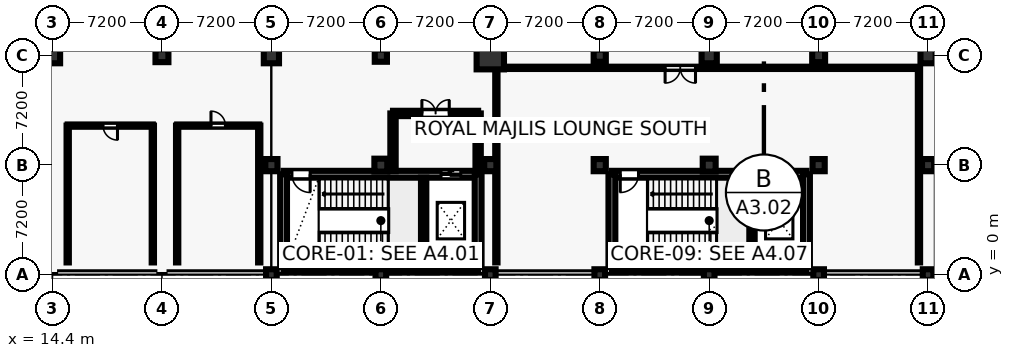
"""IFC4 building model, lengths in metres.
Left out: names, types, materials, properties, quantities, classifications, styles, units other than length and angle.
Written with IfcOpenShell. Run it as: python <this file> out.ifc"""

import sys

from ifc_helpers import new_model, si_unit, direction, frame, frame_2d, origin, origin_2d, place, context, subcontext, project, spatial, rectangle, circle, extrude, element, fill, save


model = new_model("IFC4")
c1 = context("Model", 3, precision=1e-05, world=origin(), true_north=direction((0.0, 1.0)))
c2 = subcontext(c1, "Body", "Model", "MODEL_VIEW")
j1 = project(units=[si_unit("LENGTHUNIT", "METRE"), si_unit("PLANEANGLEUNIT", "RADIAN")], contexts=[c1])
p1 = place(None, origin())
s1 = spatial("IfcSite", under=j1, at=p1, CompositionType="ELEMENT")
p2 = place(p1, origin())
s2 = spatial("IfcBuilding", under=s1, at=p2, CompositionType="ELEMENT")
p3 = place(p2, frame((0.0, 0.0, 5.4)))
s3 = spatial("IfcBuildingStorey", under=s2, at=p3, CompositionType="ELEMENT", Elevation=5.4)
p4 = place(p3, frame((14.4, 14.4, 0.0), z_axis=(0.0, 0.0, 1.0), x_axis=(1.0, 0.0, 0.0)))
e1 = element("IfcColumn", 1, at=p4, inside=s3, PredefinedType="COLUMN", context=c2, shape_type="SweptSolid", body=[
    extrude(circle(Radius=0.5, at=origin_2d()), origin(), (0.0, 0.0, 1.0), 4.2),
])
p5 = place(p3, frame((21.6, 14.4, 0.0), z_axis=(0.0, 0.0, 1.0), x_axis=(1.0, 0.0, 0.0)))
e2 = element("IfcColumn", 2, at=p5, inside=s3, PredefinedType="COLUMN", context=c2, shape_type="SweptSolid", body=[
    extrude(rectangle(XDim=0.85, YDim=0.85, at=origin_2d()), origin(), (0.0, 0.0, 1.0), 4.2),
])
p6 = place(p3, frame((28.8, 0.0, 0.0), z_axis=(0.0, 0.0, 1.0), x_axis=(1.0, 0.0, 0.0)))
e3 = element("IfcColumn", 3, at=p6, inside=s3, PredefinedType="COLUMN", context=c2, shape_type="SweptSolid", body=[
    extrude(rectangle(XDim=0.7, YDim=0.7, at=origin_2d()), origin(), (0.0, 0.0, 1.0), 4.2),
])
p7 = place(p3, frame((28.8, 7.2, 0.0), z_axis=(0.0, 0.0, 1.0), x_axis=(1.0, 0.0, 0.0)))
e4 = element("IfcColumn", 4, at=p7, inside=s3, PredefinedType="COLUMN", context=c2, shape_type="SweptSolid", body=[
    extrude(rectangle(XDim=0.8, YDim=0.8, at=origin_2d()), origin(), (0.0, 0.0, 1.0), 4.2),
])
p8 = place(p3, frame((28.8, 14.4, 0.0), z_axis=(0.0, 0.0, 1.0), x_axis=(1.0, 0.0, 0.0)))
e5 = element("IfcColumn", 5, at=p8, inside=s3, PredefinedType="COLUMN", context=c2, shape_type="SweptSolid", body=[
    extrude(circle(Radius=0.5, at=origin_2d()), origin(), (0.0, 0.0, 1.0), 4.2),
])
p9 = place(p3, frame((36.0, 0.0, 0.0), z_axis=(0.0, 0.0, 1.0), x_axis=(1.0, 0.0, 0.0)))
e6 = element("IfcColumn", 6, at=p9, inside=s3, PredefinedType="COLUMN", context=c2, shape_type="SweptSolid", body=[
    extrude(rectangle(XDim=0.7, YDim=0.7, at=origin_2d()), origin(), (0.0, 0.0, 1.0), 4.2),
])
p10 = place(p3, frame((36.0, 7.2, 0.0), z_axis=(0.0, 0.0, 1.0), x_axis=(1.0, 0.0, 0.0)))
e7 = element("IfcColumn", 7, at=p10, inside=s3, PredefinedType="COLUMN", context=c2, shape_type="SweptSolid", body=[
    extrude(rectangle(XDim=0.85, YDim=0.85, at=origin_2d()), origin(), (0.0, 0.0, 1.0), 4.2),
])
p11 = place(p3, frame((36.0, 14.4, 0.0), z_axis=(0.0, 0.0, 1.0), x_axis=(1.0, 0.0, 0.0)))
e8 = element("IfcColumn", 8, at=p11, inside=s3, PredefinedType="COLUMN", context=c2, shape_type="SweptSolid", body=[
    extrude(rectangle(XDim=0.8, YDim=0.8, at=origin_2d()), origin(), (0.0, 0.0, 1.0), 4.2),
])
p12 = place(p3, frame((43.2, 0.0, 0.0), z_axis=(0.0, 0.0, 1.0), x_axis=(1.0, 0.0, 0.0)))
e9 = element("IfcColumn", 9, at=p12, inside=s3, PredefinedType="COLUMN", context=c2, shape_type="SweptSolid", body=[
    extrude(rectangle(XDim=0.7, YDim=0.7, at=origin_2d()), origin(), (0.0, 0.0, 1.0), 4.2),
])
p13 = place(p3, frame((43.2, 7.2, 0.0), z_axis=(0.0, 0.0, 1.0), x_axis=(1.0, 0.0, 0.0)))
e10 = element("IfcColumn", 10, at=p13, inside=s3, PredefinedType="COLUMN", context=c2, shape_type="SweptSolid", body=[
    extrude(circle(Radius=0.4, at=origin_2d()), origin(), (0.0, 0.0, 1.0), 4.2),
])
p14 = place(p3, frame((43.2, 14.4, 0.0), z_axis=(0.0, 0.0, 1.0), x_axis=(1.0, 0.0, 0.0)))
e11 = element("IfcColumn", 11, at=p14, inside=s3, PredefinedType="COLUMN", context=c2, shape_type="SweptSolid", body=[
    extrude(circle(Radius=0.9, at=origin_2d()), origin(), (0.0, 0.0, 1.0), 4.2),
])
p15 = place(p3, frame((50.4, 0.0, 0.0), z_axis=(0.0, 0.0, 1.0), x_axis=(1.0, 0.0, 0.0)))
e12 = element("IfcColumn", 12, at=p15, inside=s3, PredefinedType="COLUMN", context=c2, shape_type="SweptSolid", body=[
    extrude(rectangle(XDim=0.7, YDim=0.7, at=origin_2d()), origin(), (0.0, 0.0, 1.0), 4.2),
])
p16 = place(p3, frame((50.4, 7.2, 0.0), z_axis=(0.0, 0.0, 1.0), x_axis=(1.0, 0.0, 0.0)))
e13 = element("IfcColumn", 13, at=p16, inside=s3, PredefinedType="COLUMN", context=c2, shape_type="SweptSolid", body=[
    extrude(rectangle(XDim=0.8, YDim=0.8, at=origin_2d()), origin(), (0.0, 0.0, 1.0), 4.2),
])
p17 = place(p3, frame((50.4, 14.4, 0.0), z_axis=(0.0, 0.0, 1.0), x_axis=(1.0, 0.0, 0.0)))
e14 = element("IfcColumn", 14, at=p17, inside=s3, PredefinedType="COLUMN", context=c2, shape_type="SweptSolid", body=[
    extrude(circle(Radius=0.4, at=origin_2d()), origin(), (0.0, 0.0, 1.0), 4.2),
])
p18 = place(p3, frame((57.6, 0.0, 0.0), z_axis=(0.0, 0.0, 1.0), x_axis=(1.0, 0.0, 0.0)))
e15 = element("IfcColumn", 15, at=p18, inside=s3, PredefinedType="COLUMN", context=c2, shape_type="SweptSolid", body=[
    extrude(rectangle(XDim=0.7, YDim=0.7, at=origin_2d()), origin(), (0.0, 0.0, 1.0), 4.2),
])
p19 = place(p3, frame((57.6, 7.2, 0.0), z_axis=(0.0, 0.0, 1.0), x_axis=(1.0, 0.0, 0.0)))
e16 = element("IfcColumn", 16, at=p19, inside=s3, PredefinedType="COLUMN", context=c2, shape_type="SweptSolid", body=[
    extrude(rectangle(XDim=0.85, YDim=0.85, at=origin_2d()), origin(), (0.0, 0.0, 1.0), 4.2),
])
p20 = place(p3, frame((57.6, 14.4, 0.0), z_axis=(0.0, 0.0, 1.0), x_axis=(1.0, 0.0, 0.0)))
e17 = element("IfcColumn", 17, at=p20, inside=s3, PredefinedType="COLUMN", context=c2, shape_type="SweptSolid", body=[
    extrude(circle(Radius=0.5, at=origin_2d()), origin(), (0.0, 0.0, 1.0), 4.2),
])
p21 = place(p3, frame((64.8, 0.0, 0.0), z_axis=(0.0, 0.0, 1.0), x_axis=(1.0, 0.0, 0.0)))
e18 = element("IfcColumn", 18, at=p21, inside=s3, PredefinedType="COLUMN", context=c2, shape_type="SweptSolid", body=[
    extrude(rectangle(XDim=0.7, YDim=0.7, at=origin_2d()), origin(), (0.0, 0.0, 1.0), 4.2),
])
p22 = place(p3, frame((64.8, 7.2, 0.0), z_axis=(0.0, 0.0, 1.0), x_axis=(1.0, 0.0, 0.0)))
e19 = element("IfcColumn", 19, at=p22, inside=s3, PredefinedType="COLUMN", context=c2, shape_type="SweptSolid", body=[
    extrude(circle(Radius=0.4, at=origin_2d()), origin(), (0.0, 0.0, 1.0), 4.2),
])
p23 = place(p3, frame((64.8, 14.4, 0.0), z_axis=(0.0, 0.0, 1.0), x_axis=(1.0, 0.0, 0.0)))
e20 = element("IfcColumn", 20, at=p23, inside=s3, PredefinedType="COLUMN", context=c2, shape_type="SweptSolid", body=[
    extrude(rectangle(XDim=0.85, YDim=0.85, at=origin_2d()), origin(), (0.0, 0.0, 1.0), 4.2),
])
p24 = place(p3, frame((72.0, 0.0, 0.0), z_axis=(0.0, 0.0, 1.0), x_axis=(1.0, 0.0, 0.0)))
e21 = element("IfcColumn", 21, at=p24, inside=s3, PredefinedType="COLUMN", context=c2, shape_type="SweptSolid", body=[
    extrude(rectangle(XDim=0.7, YDim=0.7, at=origin_2d()), origin(), (0.0, 0.0, 1.0), 4.2),
])
p25 = place(p3, frame((72.0, 7.2, 0.0), z_axis=(0.0, 0.0, 1.0), x_axis=(1.0, 0.0, 0.0)))
e22 = element("IfcColumn", 22, at=p25, inside=s3, PredefinedType="COLUMN", context=c2, shape_type="SweptSolid", body=[
    extrude(rectangle(XDim=0.8, YDim=0.8, at=origin_2d()), origin(), (0.0, 0.0, 1.0), 4.2),
])
p26 = place(p3, frame((72.0, 14.4, 0.0), z_axis=(0.0, 0.0, 1.0), x_axis=(1.0, 0.0, 0.0)))
e23 = element("IfcColumn", 23, at=p26, inside=s3, PredefinedType="COLUMN", context=c2, shape_type="SweptSolid", body=[
    extrude(circle(Radius=0.5, at=origin_2d()), origin(), (0.0, 0.0, 1.0), 4.2),
])
p27 = place(p3, frame((29.6, 0.5, 0.0), z_axis=(0.0, 0.0, 1.0), x_axis=(1.0, 0.0, 0.0)))
e24 = element("IfcWall", 24, at=p27, inside=s3, PredefinedType="SHEAR", context=c2, shape_type="SweptSolid", body=[
    extrude(rectangle(XDim=12.8, YDim=0.45, at=frame_2d((6.4, 0.0))), origin(), (0.0, 0.0, 1.0), 3.92),
])
p28 = place(p3, frame((29.6, 6.6, 0.0), z_axis=(0.0, 0.0, 1.0), x_axis=(1.0, 0.0, 0.0)))
e25 = element("IfcWall", 25, at=p28, inside=s3, PredefinedType="SHEAR", context=c2, shape_type="SweptSolid", body=[
    extrude(rectangle(XDim=12.8, YDim=0.45, at=frame_2d((6.4, 0.0))), origin(), (0.0, 0.0, 1.0), 3.92),
])
p29 = place(p28, frame((0.55, 0.0, 0.0)))
e26 = element("IfcOpeningElement", 26, at=p29, cuts=e25, PredefinedType="OPENING", context=c2, shape_type="SweptSolid", body=[
    extrude(rectangle(XDim=1.2, YDim=2.25, at=frame_2d((0.6, 1.125))), frame((0.0, 0.235, 0.0), z_axis=(0.0, -1.0, 0.0), x_axis=(1.0, 0.0, 0.0)), (0.0, 0.0, 1.0), 0.47),
])
p30 = place(p28, frame((10.358, 0.0, 0.0)))
e27 = element("IfcOpeningElement", 27, at=p30, cuts=e25, PredefinedType="OPENING", context=c2, shape_type="SweptSolid", body=[
    extrude(rectangle(XDim=1.3, YDim=2.25, at=frame_2d((0.65, 1.125))), frame((0.0, 0.235, 0.0), z_axis=(0.0, -1.0, 0.0), x_axis=(1.0, 0.0, 0.0)), (0.0, 0.0, 1.0), 0.47),
])
for number, where, z_axis, x_axis in (
    (28, (29.6, 0.5, 0.0), (0.0, 0.0, 1.0), (0.0, 1.0, 0.0)),
    (29, (42.4, 0.5, 0.0), (0.0, 0.0, 1.0), (0.0, 1.0, 0.0)),
):
    element("IfcWall", number, at=place(p3, frame(where, z_axis=z_axis, x_axis=x_axis)), inside=s3, PredefinedType="SHEAR", context=c2, shape_type="SweptSolid", body=[
        extrude(rectangle(XDim=6.1, YDim=0.45, at=frame_2d((3.05, 0.0))), origin(), (0.0, 0.0, 1.0), 3.92),
    ])
p31 = place(p3, frame((38.816, 0.725, 0.0), z_axis=(0.0, 0.0, 1.0), x_axis=(0.0, 1.0, 0.0)))
e30 = element("IfcWall", 30, at=p31, inside=s3, PredefinedType="SHEAR", context=c2, shape_type="SweptSolid", body=[
    extrude(rectangle(XDim=5.65, YDim=0.35, at=frame_2d((2.825, 0.0))), origin(), (0.0, 0.0, 1.0), 3.92),
])
p32 = place(p3, frame((51.2, 0.5, 0.0), z_axis=(0.0, 0.0, 1.0), x_axis=(1.0, 0.0, 0.0)))
e31 = element("IfcWall", 31, at=p32, inside=s3, PredefinedType="SHEAR", context=c2, shape_type="SweptSolid", body=[
    extrude(rectangle(XDim=12.8, YDim=0.45, at=frame_2d((6.4, 0.0))), origin(), (0.0, 0.0, 1.0), 3.92),
])
p33 = place(p3, frame((51.2, 6.6, 0.0), z_axis=(0.0, 0.0, 1.0), x_axis=(1.0, 0.0, 0.0)))
e32 = element("IfcWall", 32, at=p33, inside=s3, PredefinedType="SHEAR", context=c2, shape_type="SweptSolid", body=[
    extrude(rectangle(XDim=12.8, YDim=0.45, at=frame_2d((6.4, 0.0))), origin(), (0.0, 0.0, 1.0), 3.92),
])
p34 = place(p33, frame((0.55, 0.0, 0.0)))
e33 = element("IfcOpeningElement", 33, at=p34, cuts=e32, PredefinedType="OPENING", context=c2, shape_type="SweptSolid", body=[
    extrude(rectangle(XDim=1.2, YDim=2.25, at=frame_2d((0.6, 1.125))), frame((0.0, 0.235, 0.0), z_axis=(0.0, -1.0, 0.0), x_axis=(1.0, 0.0, 0.0)), (0.0, 0.0, 1.0), 0.47),
])
p35 = place(p33, frame((10.458, 0.0, 0.0)))
e34 = element("IfcOpeningElement", 34, at=p35, cuts=e32, PredefinedType="OPENING", context=c2, shape_type="SweptSolid", body=[
    extrude(rectangle(XDim=1.1, YDim=2.2, at=frame_2d((0.55, 1.1))), frame((0.0, 0.235, 0.0), z_axis=(0.0, -1.0, 0.0), x_axis=(1.0, 0.0, 0.0)), (0.0, 0.0, 1.0), 0.47),
])
for number, where, z_axis, x_axis in (
    (35, (51.2, 0.5, 0.0), (0.0, 0.0, 1.0), (0.0, 1.0, 0.0)),
    (36, (64.0, 0.5, 0.0), (0.0, 0.0, 1.0), (0.0, 1.0, 0.0)),
):
    element("IfcWall", number, at=place(p3, frame(where, z_axis=z_axis, x_axis=x_axis)), inside=s3, PredefinedType="SHEAR", context=c2, shape_type="SweptSolid", body=[
        extrude(rectangle(XDim=6.1, YDim=0.45, at=frame_2d((3.05, 0.0))), origin(), (0.0, 0.0, 1.0), 3.92),
    ])
p36 = place(p3, frame((60.416, 0.725, 0.0), z_axis=(0.0, 0.0, 1.0), x_axis=(0.0, 1.0, 0.0)))
e37 = element("IfcWall", 37, at=p36, inside=s3, PredefinedType="SHEAR", context=c2, shape_type="SweptSolid", body=[
    extrude(rectangle(XDim=5.65, YDim=0.35, at=frame_2d((2.825, 0.0))), origin(), (0.0, 0.0, 1.0), 3.92),
])
p37 = place(p3, frame((42.4, 6.8, 0.0), z_axis=(0.0, 0.0, 1.0), x_axis=(0.0, 1.0, 0.0)))
e38 = element("IfcWall", 38, at=p37, inside=s3, PredefinedType="SHEAR", context=c2, shape_type="SweptSolid", body=[
    extrude(rectangle(XDim=3.8, YDim=0.35, at=frame_2d((1.9, 0.0))), origin(), (0.0, 0.0, 1.0), 2.98),
])
p38 = place(p3, frame((42.4, 10.6, 0.0), z_axis=(0.0, 0.0, 1.0), x_axis=(-1.0, 0.0, 0.0)))
e39 = element("IfcWall", 39, at=p38, inside=s3, PredefinedType="SHEAR", context=c2, shape_type="SweptSolid", body=[
    extrude(rectangle(XDim=5.6, YDim=0.35, at=frame_2d((2.8, 0.0))), origin(), (0.0, 0.0, 1.0), 2.98),
])
p39 = place(p38, frame((1.9, 0.0, 0.0)))
e40 = element("IfcOpeningElement", 40, at=p39, cuts=e39, PredefinedType="OPENING", context=c2, shape_type="SweptSolid", body=[
    extrude(rectangle(XDim=1.8, YDim=2.3, at=frame_2d((0.9, 1.15))), frame((0.0, 0.185, 0.0), z_axis=(0.0, -1.0, 0.0), x_axis=(1.0, 0.0, 0.0)), (0.0, 0.0, 1.0), 0.37),
])
p40 = place(p3, frame((36.8, 10.6, 0.0), z_axis=(0.0, 0.0, 1.0), x_axis=(0.0, -1.0, 0.0)))
e41 = element("IfcWall", 41, at=p40, inside=s3, PredefinedType="SHEAR", context=c2, shape_type="SweptSolid", body=[
    extrude(rectangle(XDim=3.8, YDim=0.35, at=frame_2d((1.9, 0.0))), origin(), (0.0, 0.0, 1.0), 2.98),
])
p41 = place(p3, frame((71.4, 0.8, 0.0), z_axis=(0.0, 0.0, 1.0), x_axis=(0.0, 1.0, 0.0)))
e42 = element("IfcWall", 42, at=p41, inside=s3, PredefinedType="PARTITIONING", context=c2, shape_type="SweptSolid", body=[
    extrude(rectangle(XDim=12.8, YDim=0.15, at=frame_2d((6.4, 0.0))), origin(), (0.0, 0.0, 1.0), 2.98),
])
p42 = place(p3, frame((71.4, 13.6, 0.0), z_axis=(0.0, 0.0, 1.0), x_axis=(-1.0, 0.0, 0.0)))
e43 = element("IfcWall", 43, at=p42, inside=s3, PredefinedType="PARTITIONING", context=c2, shape_type="SweptSolid", body=[
    extrude(rectangle(XDim=27.8, YDim=0.15, at=frame_2d((13.9, 0.0))), origin(), (0.0, 0.0, 1.0), 2.98),
])
p43 = place(p42, frame((14.7, 0.0, 0.0)))
e44 = element("IfcOpeningElement", 44, at=p43, cuts=e43, PredefinedType="OPENING", context=c2, shape_type="SweptSolid", body=[
    extrude(rectangle(XDim=2.0, YDim=2.4, at=frame_2d((1.0, 1.2))), frame((0.0, 0.085, 0.0), z_axis=(0.0, -1.0, 0.0), x_axis=(1.0, 0.0, 0.0)), (0.0, 0.0, 1.0), 0.17),
])
p44 = place(p3, frame((43.6, 13.6, 0.0), z_axis=(0.0, 0.0, 1.0), x_axis=(0.0, -1.0, 0.0)))
e45 = element("IfcWall", 45, at=p44, inside=s3, PredefinedType="PARTITIONING", context=c2, shape_type="SweptSolid", body=[
    extrude(rectangle(XDim=12.8, YDim=0.15, at=frame_2d((6.4, 0.0))), origin(), (0.0, 0.0, 1.0), 2.98),
])
p45 = place(p3, frame((21.0, 0.8, 0.0), z_axis=(0.0, 0.0, 1.0), x_axis=(0.0, 1.0, 0.0)))
e46 = element("IfcWall", 46, at=p45, inside=s3, PredefinedType="PARTITIONING", context=c2, shape_type="SweptSolid", body=[
    extrude(rectangle(XDim=9.0, YDim=0.15, at=frame_2d((4.5, 0.0))), origin(), (0.0, 0.0, 1.0), 2.98),
])
p46 = place(p3, frame((21.0, 9.8, 0.0), z_axis=(0.0, 0.0, 1.0), x_axis=(-1.0, 0.0, 0.0)))
e47 = element("IfcWall", 47, at=p46, inside=s3, PredefinedType="PARTITIONING", context=c2, shape_type="SweptSolid", body=[
    extrude(rectangle(XDim=5.6, YDim=0.15, at=frame_2d((2.8, 0.0))), origin(), (0.0, 0.0, 1.0), 2.98),
])
p47 = place(p46, frame((2.325, 0.0, 0.0)))
e48 = element("IfcOpeningElement", 48, at=p47, cuts=e47, PredefinedType="OPENING", context=c2, shape_type="SweptSolid", body=[
    extrude(rectangle(XDim=0.95, YDim=2.15, at=frame_2d((0.475, 1.075))), frame((0.0, 0.085, 0.0), z_axis=(0.0, -1.0, 0.0), x_axis=(1.0, 0.0, 0.0)), (0.0, 0.0, 1.0), 0.17),
])
for number, where, z_axis, x_axis in (
    (49, (15.4, 9.8, 0.0), (0.0, 0.0, 1.0), (0.0, -1.0, 0.0)),
    (50, (28.0, 0.8, 0.0), (0.0, 0.0, 1.0), (0.0, 1.0, 0.0)),
):
    element("IfcWall", number, at=place(p3, frame(where, z_axis=z_axis, x_axis=x_axis)), inside=s3, PredefinedType="PARTITIONING", context=c2, shape_type="SweptSolid", body=[
        extrude(rectangle(XDim=9.0, YDim=0.15, at=frame_2d((4.5, 0.0))), origin(), (0.0, 0.0, 1.0), 2.98),
    ])
p48 = place(p3, frame((28.0, 9.8, 0.0), z_axis=(0.0, 0.0, 1.0), x_axis=(-1.0, 0.0, 0.0)))
e51 = element("IfcWall", 51, at=p48, inside=s3, PredefinedType="PARTITIONING", context=c2, shape_type="SweptSolid", body=[
    extrude(rectangle(XDim=5.4, YDim=0.15, at=frame_2d((2.7, 0.0))), origin(), (0.0, 0.0, 1.0), 2.98),
])
p49 = place(p48, frame((2.225, 0.0, 0.0)))
e52 = element("IfcOpeningElement", 52, at=p49, cuts=e51, PredefinedType="OPENING", context=c2, shape_type="SweptSolid", body=[
    extrude(rectangle(XDim=0.95, YDim=2.15, at=frame_2d((0.475, 1.075))), frame((0.0, 0.085, 0.0), z_axis=(0.0, -1.0, 0.0), x_axis=(1.0, 0.0, 0.0)), (0.0, 0.0, 1.0), 0.17),
])
p50 = place(p3, frame((22.6, 9.8, 0.0), z_axis=(0.0, 0.0, 1.0), x_axis=(0.0, -1.0, 0.0)))
e53 = element("IfcWall", 53, at=p50, inside=s3, PredefinedType="PARTITIONING", context=c2, shape_type="SweptSolid", body=[
    extrude(rectangle(XDim=9.0, YDim=0.15, at=frame_2d((4.5, 0.0))), origin(), (0.0, 0.0, 1.0), 2.98),
])
p51 = place(p29, frame((1.2, 0.0, 0.0), z_axis=(0.0, 0.0, 1.0), x_axis=(-1.0, 0.0, 0.0)))
e54 = element("IfcDoor", 54, at=p51, inside=s3, OperationType="SINGLE_SWING_RIGHT", PredefinedType="DOOR", context=c2, shape_type="SweptSolid", body=[
    extrude(rectangle(XDim=1.2, YDim=2.25, at=frame_2d((0.6, 1.125))), frame((0.0, 0.025, 0.0), z_axis=(0.0, -1.0, 0.0), x_axis=(1.0, 0.0, 0.0)), (0.0, 0.0, 1.0), 0.05),
])
fill(e26, e54)
p52 = place(p30, origin())
e55 = element("IfcDoor", 55, at=p52, inside=s3, OperationType="SLIDING_TO_LEFT", PredefinedType="DOOR", context=c2, shape_type="SweptSolid", body=[
    extrude(rectangle(XDim=1.3, YDim=2.25, at=frame_2d((0.65, 1.125))), frame((0.0, 0.025, 0.0), z_axis=(0.0, -1.0, 0.0), x_axis=(1.0, 0.0, 0.0)), (0.0, 0.0, 1.0), 0.05),
])
fill(e27, e55)
p53 = place(p34, frame((1.2, 0.0, 0.0), z_axis=(0.0, 0.0, 1.0), x_axis=(-1.0, 0.0, 0.0)))
e56 = element("IfcDoor", 56, at=p53, inside=s3, OperationType="SINGLE_SWING_LEFT", PredefinedType="DOOR", context=c2, shape_type="SweptSolid", body=[
    extrude(rectangle(XDim=1.2, YDim=2.25, at=frame_2d((0.6, 1.125))), frame((0.0, 0.025, 0.0), z_axis=(0.0, -1.0, 0.0), x_axis=(1.0, 0.0, 0.0)), (0.0, 0.0, 1.0), 0.05),
])
fill(e33, e56)
p54 = place(p35, origin())
e57 = element("IfcDoor", 57, at=p54, inside=s3, OperationType="SLIDING_TO_RIGHT", PredefinedType="DOOR", context=c2, shape_type="SweptSolid", body=[
    extrude(rectangle(XDim=1.1, YDim=2.2, at=frame_2d((0.55, 1.1))), frame((0.0, 0.025, 0.0), z_axis=(0.0, -1.0, 0.0), x_axis=(1.0, 0.0, 0.0)), (0.0, 0.0, 1.0), 0.05),
])
fill(e34, e57)
p55 = place(p39, frame((1.8, 0.0, 0.0), z_axis=(0.0, 0.0, 1.0), x_axis=(-1.0, 0.0, 0.0)))
e58 = element("IfcDoor", 58, at=p55, inside=s3, OperationType="DOUBLE_DOOR_SINGLE_SWING", PredefinedType="DOOR", context=c2, shape_type="SweptSolid", body=[
    extrude(rectangle(XDim=1.8, YDim=2.3, at=frame_2d((0.9, 1.15))), frame((0.0, 0.025, 0.0), z_axis=(0.0, -1.0, 0.0), x_axis=(1.0, 0.0, 0.0)), (0.0, 0.0, 1.0), 0.05),
])
fill(e40, e58)
p56 = place(p43, origin())
e59 = element("IfcDoor", 59, at=p56, inside=s3, OperationType="DOUBLE_DOOR_SINGLE_SWING", PredefinedType="DOOR", context=c2, shape_type="SweptSolid", body=[
    extrude(rectangle(XDim=2.0, YDim=2.4, at=frame_2d((1.0, 1.2))), frame((0.0, 0.025, 0.0), z_axis=(0.0, -1.0, 0.0), x_axis=(1.0, 0.0, 0.0)), (0.0, 0.0, 1.0), 0.05),
])
fill(e44, e59)
p57 = place(p47, origin())
e60 = element("IfcDoor", 60, at=p57, inside=s3, OperationType="SINGLE_SWING_LEFT", PredefinedType="DOOR", context=c2, shape_type="SweptSolid", body=[
    extrude(rectangle(XDim=0.95, YDim=2.15, at=frame_2d((0.475, 1.075))), frame((0.0, 0.025, 0.0), z_axis=(0.0, -1.0, 0.0), x_axis=(1.0, 0.0, 0.0)), (0.0, 0.0, 1.0), 0.05),
])
fill(e48, e60)
p58 = place(p49, frame((0.95, 0.0, 0.0), z_axis=(0.0, 0.0, 1.0), x_axis=(-1.0, 0.0, 0.0)))
e61 = element("IfcDoor", 61, at=p58, inside=s3, OperationType="SINGLE_SWING_RIGHT", PredefinedType="DOOR", context=c2, shape_type="SweptSolid", body=[
    extrude(rectangle(XDim=0.95, YDim=2.15, at=frame_2d((0.475, 1.075))), frame((0.0, 0.025, 0.0), z_axis=(0.0, -1.0, 0.0), x_axis=(1.0, 0.0, 0.0)), (0.0, 0.0, 1.0), 0.05),
])
fill(e52, e61)
save(model, sys.argv[1])
